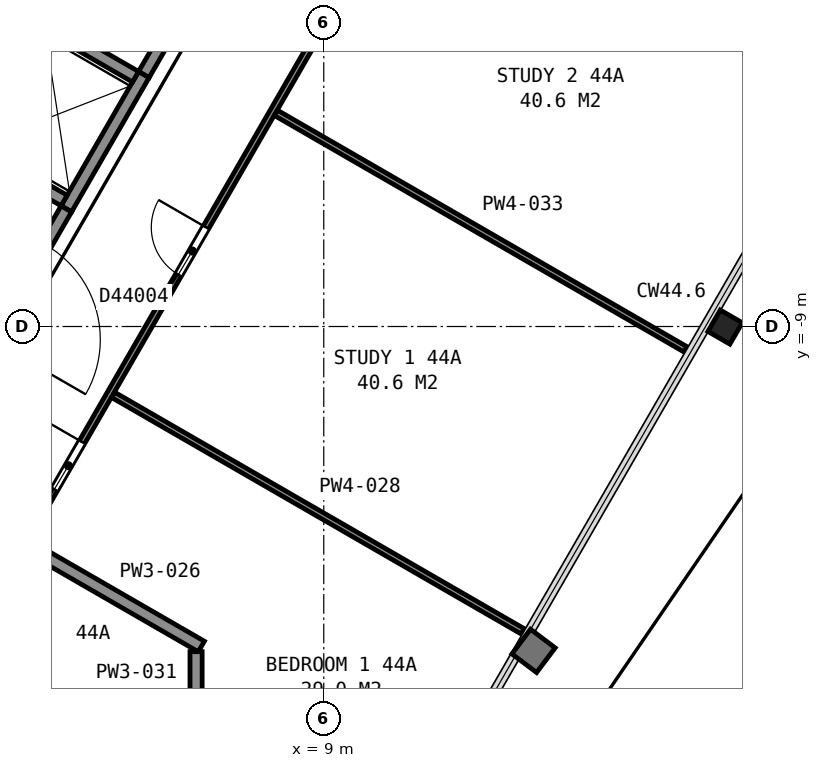
"""IFC4 building model, lengths in metres.
Left out: names, types, materials, properties, quantities, classifications, styles, units other than length and angle.
Written with IfcOpenShell. Run it as: python <this file> out.ifc"""

import sys

from ifc_helpers import new_model, si_unit, direction, frame, frame_2d, origin, origin_2d, place, context, subcontext, project, spatial, rectangle, i_section, extrude, element, fill, save


model = new_model("IFC4")
c1 = context("Model", 3, precision=1e-05, world=origin(), true_north=direction((0.0, 1.0)))
c2 = subcontext(c1, "Body", "Model", "MODEL_VIEW")
j1 = project(units=[si_unit("LENGTHUNIT", "METRE"), si_unit("PLANEANGLEUNIT", "RADIAN")], contexts=[c1])
p1 = place(None, origin())
s1 = spatial("IfcSite", under=j1, at=p1, CompositionType="ELEMENT")
p2 = place(p1, origin())
s2 = spatial("IfcBuilding", under=s1, at=p2, CompositionType="ELEMENT")
p3 = place(p2, frame((0.0, 0.0, 178.4)))
s3 = spatial("IfcBuildingStorey", under=s2, at=p3, CompositionType="ELEMENT", Elevation=178.4)
p4 = place(p3, frame((15.6, -9.01, 0.035), z_axis=(0.0, 0.0, 1.0), x_axis=(-0.5, -0.866025403784, 0.0)))
e1 = element("IfcColumn", 1, at=p4, inside=s3, PredefinedType="COLUMN", context=c2, shape_type="SweptSolid", body=[
    extrude(i_section(OverallWidth=0.406, OverallDepth=0.417, WebThickness=0.03, FlangeThickness=0.048, FilletRadius=0.015, at=origin_2d()), origin(), (0.0, 0.0, 1.0), 3.665),
])
p5 = place(p3, frame((4.766, -7.065, 0.0), z_axis=(0.0, 0.0, 1.0), x_axis=(0.499948979701, 0.866054858364, 0.0)))
e2 = element("IfcWall", 2, at=p5, inside=s3, PredefinedType="PARTITIONING", context=c2, shape_type="SweptSolid", body=[
    extrude(rectangle(XDim=2.55, YDim=0.2, at=frame_2d((1.275, 0.0))), origin(), (0.0, 0.0, 1.0), 3.7),
])
p6 = place(p3, frame((5.905, -4.893, 0.0), z_axis=(0.0, 0.0, 1.0), x_axis=(-0.866002029911, 0.500040482552, 0.0)))
e3 = element("IfcWall", 3, at=p6, inside=s3, PredefinedType="PARTITIONING", context=c2, shape_type="SweptSolid", body=[
    extrude(rectangle(XDim=1.75, YDim=0.2, at=frame_2d((0.875, 0.0))), origin(), (0.0, 0.0, 1.0), 3.7),
])
p7 = place(p3, frame((4.73, -6.928, 0.0), z_axis=(0.0, 0.0, 1.0), x_axis=(-0.866036909293, 0.499980071345, 0.0)))
e4 = element("IfcWall", 4, at=p7, inside=s3, PredefinedType="PARTITIONING", context=c2, shape_type="SweptSolid", body=[
    extrude(rectangle(XDim=1.75, YDim=0.2, at=frame_2d((0.875, 0.0))), origin(), (0.0, 0.0, 1.0), 3.7),
])
p8 = place(p3, frame((1.677, -12.415, 0.0), z_axis=(0.0, 0.0, 1.0), x_axis=(0.500054337157, 0.865994029939, 0.0)))
e5 = element("IfcWall", 5, at=p8, inside=s3, PredefinedType="PARTITIONING", context=c2, shape_type="SweptSolid", body=[
    extrude(rectangle(XDim=6.177, YDim=0.2, at=frame_2d((3.088, 0.0))), origin(), (0.0, 0.0, 1.0), 3.45),
])
p9 = place(p8, frame((3.695, 0.0, 0.0)))
e6 = element("IfcOpeningElement", 6, at=p9, cuts=e5, PredefinedType="OPENING", context=c2, shape_type="SweptSolid", body=[
    extrude(rectangle(XDim=1.8, YDim=2.1, at=frame_2d((0.9, 1.05))), frame((0.0, 0.11, 0.0), z_axis=(0.0, -1.0, 0.0), x_axis=(1.0, 0.0, 0.0)), (0.0, 0.0, 1.0), 0.22),
])
p10 = place(p3, frame((6.042, -4.855, 0.0), z_axis=(0.0, 0.0, 1.0), x_axis=(0.500252727967, 0.865879442048, 0.0)))
e7 = element("IfcWall", 7, at=p10, inside=s3, PredefinedType="PARTITIONING", context=c2, shape_type="SweptSolid", body=[
    extrude(rectangle(XDim=2.617, YDim=0.2, at=frame_2d((1.309, 0.0))), origin(), (0.0, 0.0, 1.0), 3.45),
])
p11 = place(p3, frame((4.25, -12.684, 0.0), z_axis=(0.0, 0.0, 1.0), x_axis=(0.866109679077, -0.499854002494, 0.0)))
e8 = element("IfcWall", 8, at=p11, inside=s3, PredefinedType="PARTITIONING", context=c2, shape_type="SweptSolid", body=[
    extrude(rectangle(XDim=3.16, YDim=0.2, at=frame_2d((1.58, 0.0))), origin(), (0.0, 0.0, 1.0), 2.713),
])
p12 = place(p3, frame((12.903, 2.745, 0.0), z_axis=(0.0, 0.0, 1.0), x_axis=(-0.499997333799, -0.866026943111, 0.0)))
e9 = element("IfcWall", 9, at=p12, inside=s3, PredefinedType="PARTITIONING", context=c2, shape_type="SweptSolid", body=[
    extrude(rectangle(XDim=17.606, YDim=0.1, at=frame_2d((8.803, 0.0))), origin(), (0.0, 0.0, 1.0), 2.713),
])
p13 = place(p12, frame((15.756, 0.0, 0.0)))
e10 = element("IfcOpeningElement", 10, at=p13, cuts=e9, PredefinedType="OPENING", context=c2, shape_type="SweptSolid", body=[
    extrude(rectangle(XDim=0.9, YDim=2.1, at=frame_2d((0.45, 1.05))), frame((0.0, 0.06, 0.0), z_axis=(0.0, -1.0, 0.0), x_axis=(1.0, 0.0, 0.0)), (0.0, 0.0, 1.0), 0.12),
])
p14 = place(p12, frame((11.679, 0.0, 0.0)))
e11 = element("IfcOpeningElement", 11, at=p14, cuts=e9, PredefinedType="OPENING", context=c2, shape_type="SweptSolid", body=[
    extrude(rectangle(XDim=0.9, YDim=2.1, at=frame_2d((0.45, 1.05))), frame((0.0, 0.06, 0.0), z_axis=(0.0, -1.0, 0.0), x_axis=(1.0, 0.0, 0.0)), (0.0, 0.0, 1.0), 0.12),
])
p15 = place(p12, frame((6.324, 0.0, 0.0)))
e12 = element("IfcOpeningElement", 12, at=p15, cuts=e9, PredefinedType="OPENING", context=c2, shape_type="SweptSolid", body=[
    extrude(rectangle(XDim=0.9, YDim=2.1, at=frame_2d((0.45, 1.05))), frame((0.0, 0.06, 0.0), z_axis=(0.0, -1.0, 0.0), x_axis=(1.0, 0.0, 0.0)), (0.0, 0.0, 1.0), 0.12),
])
p16 = place(p3, frame((5.536, -10.125, 0.0), z_axis=(0.0, 0.0, 1.0), x_axis=(0.866044474677, -0.49996696679, 0.0)))
e13 = element("IfcWall", 13, at=p16, inside=s3, PredefinedType="PARTITIONING", context=c2, shape_type="SweptSolid", body=[
    extrude(rectangle(XDim=7.779, YDim=0.1, at=frame_2d((3.889, 0.0))), origin(), (0.0, 0.0, 1.0), 2.713),
])
p17 = place(p3, frame((6.9, -16.465, 0.0), z_axis=(0.0, 0.0, 1.0), x_axis=(0.0, 1.0, 0.0)))
e14 = element("IfcWall", 14, at=p17, inside=s3, PredefinedType="PARTITIONING", context=c2, shape_type="SweptSolid", body=[
    extrude(rectangle(XDim=2.117, YDim=0.2, at=frame_2d((1.059, 0.0))), origin(), (0.0, 0.0, 1.0), 2.713),
])
p18 = place(p17, frame((0.627, 0.0, 0.0)))
e15 = element("IfcOpeningElement", 15, at=p18, cuts=e14, PredefinedType="OPENING", context=c2, shape_type="SweptSolid", body=[
    extrude(rectangle(XDim=0.8, YDim=2.1, at=frame_2d((0.4, 1.05))), frame((0.0, 0.11, 0.0), z_axis=(0.0, -1.0, 0.0), x_axis=(1.0, 0.0, 0.0)), (0.0, 0.0, 1.0), 0.22),
])
p19 = place(p3, frame((8.214, -5.487, 0.0), z_axis=(0.0, 0.0, 1.0), x_axis=(0.866007344409, -0.500031278452, 0.0)))
e16 = element("IfcWall", 16, at=p19, inside=s3, PredefinedType="PARTITIONING", context=c2, shape_type="SweptSolid", body=[
    extrude(rectangle(XDim=7.778, YDim=0.1, at=frame_2d((3.889, 0.0))), origin(), (0.0, 0.0, 1.0), 2.713),
])
p20 = place(p3, frame((10.887, -0.846, 0.0), z_axis=(0.0, 0.0, 1.0), x_axis=(0.866004841997, -0.500035612369, 0.0)))
e17 = element("IfcWall", 17, at=p20, inside=s3, PredefinedType="PARTITIONING", context=c2, shape_type="SweptSolid", body=[
    extrude(rectangle(XDim=7.783, YDim=0.1, at=frame_2d((3.892, 0.0))), origin(), (0.0, 0.0, 1.0), 2.713),
])
p21 = place(p13, origin())
e18 = element("IfcDoor", 18, at=p21, inside=s3, OperationType="SINGLE_SWING_LEFT", PredefinedType="DOOR", context=c2, shape_type="SweptSolid", body=[
    extrude(rectangle(XDim=0.9, YDim=2.1, at=frame_2d((0.45, 1.05))), frame((0.0, 0.025, 0.0), z_axis=(0.0, -1.0, 0.0), x_axis=(1.0, 0.0, 0.0)), (0.0, 0.0, 1.0), 0.05),
])
fill(e10, e18)
p22 = place(p14, origin())
e19 = element("IfcDoor", 19, at=p22, inside=s3, OperationType="SINGLE_SWING_LEFT", PredefinedType="DOOR", context=c2, shape_type="SweptSolid", body=[
    extrude(rectangle(XDim=0.9, YDim=2.1, at=frame_2d((0.45, 1.05))), frame((0.0, 0.025, 0.0), z_axis=(0.0, -1.0, 0.0), x_axis=(1.0, 0.0, 0.0)), (0.0, 0.0, 1.0), 0.05),
])
fill(e11, e19)
save(model, sys.argv[1])
